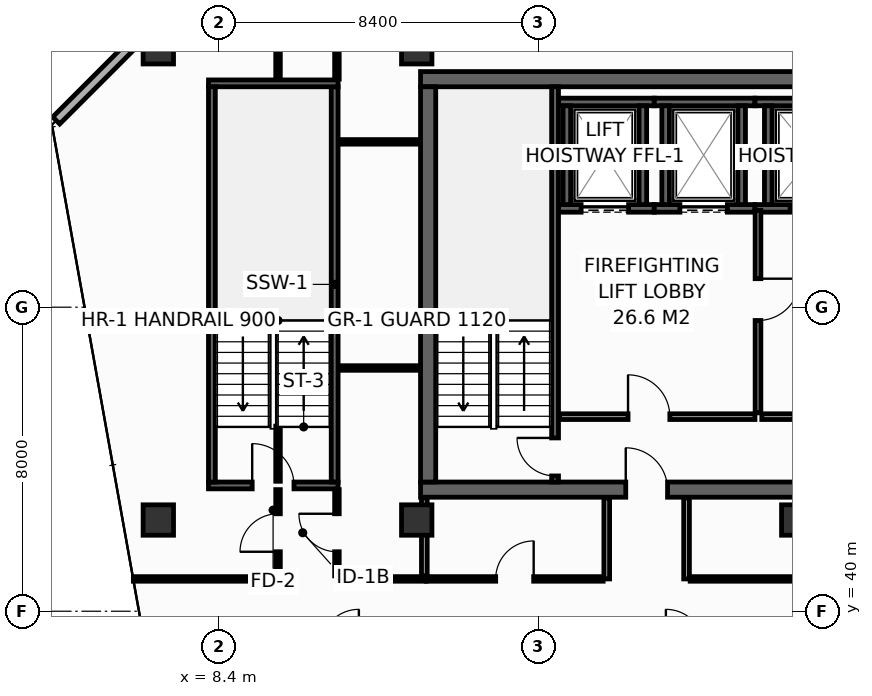
"""IFC4 building model, lengths in metres.
Left out: names, types, materials, properties, quantities, classifications, styles, units other than length and angle.
Written with IfcOpenShell. Run it as: python <this file> out.ifc"""

import sys

from ifc_helpers import new_model, si_unit, direction, frame, frame_2d, origin, origin_2d, place, context, subcontext, project, spatial, rectangle, hollow_rectangle, extrude, element, fill, save


model = new_model("IFC4")
c1 = context("Model", 3, precision=1e-05, world=origin(), true_north=direction((0.0, 1.0)))
c2 = subcontext(c1, "Body", "Model", "MODEL_VIEW")
j1 = project(units=[si_unit("LENGTHUNIT", "METRE"), si_unit("PLANEANGLEUNIT", "RADIAN")], contexts=[c1])
p1 = place(None, origin())
s1 = spatial("IfcSite", under=j1, at=p1, CompositionType="ELEMENT")
p2 = place(p1, origin())
s2 = spatial("IfcBuilding", under=s1, at=p2, CompositionType="ELEMENT")
p3 = place(p2, frame((0.0, 0.0, 257.2)))
s3 = spatial("IfcBuildingStorey", under=s2, at=p3, CompositionType="ELEMENT", Elevation=257.2)
p4 = place(p3, frame((13.7, 43.2, 0.0), z_axis=(0.0, 0.0, 1.0), x_axis=(1.0, 0.0, 0.0)))
e1 = element("IfcWall", 1, at=p4, inside=s3, PredefinedType="SHEAR", context=c2, shape_type="SweptSolid", body=[
    extrude(rectangle(XDim=32.5, YDim=0.4, at=frame_2d((16.25, 0.0))), origin(), (0.0, 0.0, 1.0), 3.55),
])
p5 = place(p4, frame((5.4, 0.0, 0.0)))
e2 = element("IfcOpeningElement", 2, at=p5, cuts=e1, PredefinedType="OPENING", context=c2, shape_type="SweptSolid", body=[
    extrude(rectangle(XDim=1.1, YDim=2.15, at=frame_2d((0.55, 1.075))), frame((0.0, 0.21, 0.0), z_axis=(0.0, -1.0, 0.0), x_axis=(1.0, 0.0, 0.0)), (0.0, 0.0, 1.0), 0.42),
])
p6 = place(p4, frame((25.6, 0.0, 0.0)))
e3 = element("IfcOpeningElement", 3, at=p6, cuts=e1, PredefinedType="OPENING", context=c2, shape_type="SweptSolid", body=[
    extrude(rectangle(XDim=1.1, YDim=2.15, at=frame_2d((0.55, 1.075))), frame((0.0, 0.21, 0.0), z_axis=(0.0, -1.0, 0.0), x_axis=(1.0, 0.0, 0.0)), (0.0, 0.0, 1.0), 0.42),
])
p7 = place(p3, frame((13.7, 54.0, 0.0), z_axis=(0.0, 0.0, 1.0), x_axis=(1.0, 0.0, 0.0)))
e4 = element("IfcWall", 4, at=p7, inside=s3, PredefinedType="SHEAR", context=c2, shape_type="SweptSolid", body=[
    extrude(rectangle(XDim=32.5, YDim=0.4, at=frame_2d((16.25, 0.0))), origin(), (0.0, 0.0, 1.0), 3.55),
])
p8 = place(p3, frame((13.9, 43.4, 0.0), z_axis=(0.0, 0.0, 1.0), x_axis=(0.0, 1.0, 0.0)))
e5 = element("IfcWall", 5, at=p8, inside=s3, PredefinedType="SHEAR", context=c2, shape_type="SweptSolid", body=[
    extrude(rectangle(XDim=10.4, YDim=0.4, at=frame_2d((5.2, 0.0))), origin(), (0.0, 0.0, 1.0), 3.55),
])
for number, where, z_axis, x_axis in (
    (6, (6.8, 54.8, 0.0), (0.0, 0.0, 1.0), (1.0, 0.0, 0.0)),
    (7, (13.6, 54.8, 0.0), (0.0, 0.0, 1.0), (1.0, 0.0, 0.0)),
    (8, (6.8, 42.4, 0.0), (0.0, 0.0, 1.0), (1.0, 0.0, 0.0)),
    (9, (13.6, 42.4, 0.0), (0.0, 0.0, 1.0), (1.0, 0.0, 0.0)),
    (10, (23.6, 42.4, 0.0), (0.0, 0.0, 1.0), (1.0, 0.0, 0.0)),
):
    element("IfcColumn", number, at=place(p3, frame(where, z_axis=z_axis, x_axis=x_axis)), inside=s3, PredefinedType="COLUMN", context=c2, shape_type="SweptSolid", body=[
        extrude(hollow_rectangle(XDim=0.8, YDim=0.8, WallThickness=0.036, at=origin_2d()), origin(), (0.0, 0.0, 1.0), 3.8),
    ])
p9 = place(p3, frame((17.33, 50.6, 0.0), z_axis=(0.0, 0.0, 1.0), x_axis=(1.0, 0.0, 0.0)))
e11 = element("IfcWall", 11, at=p9, inside=s3, PredefinedType="SHEAR", context=c2, shape_type="SweptSolid", body=[
    extrude(rectangle(XDim=2.52, YDim=0.2, at=frame_2d((1.26, 0.0))), origin(), (0.0, 0.0, 1.0), 3.55),
])
p10 = place(p9, frame((0.595, 0.0, 0.0)))
e12 = element("IfcOpeningElement", 12, at=p10, cuts=e11, PredefinedType="OPENING", context=c2, shape_type="SweptSolid", body=[
    extrude(rectangle(XDim=1.25, YDim=2.3, at=frame_2d((0.625, 1.15))), frame((0.0, 0.11, 0.0), z_axis=(0.0, -1.0, 0.0), x_axis=(1.0, 0.0, 0.0)), (0.0, 0.0, 1.0), 0.22),
])
p11 = place(p3, frame((17.33, 53.4, 0.0), z_axis=(0.0, 0.0, 1.0), x_axis=(1.0, 0.0, 0.0)))
e13 = element("IfcWall", 13, at=p11, inside=s3, PredefinedType="SHEAR", context=c2, shape_type="SweptSolid", body=[
    extrude(rectangle(XDim=2.52, YDim=0.2, at=frame_2d((1.26, 0.0))), origin(), (0.0, 0.0, 1.0), 3.55),
])
for number, where, z_axis, x_axis in (
    (14, (17.55, 50.7, 0.0), (0.0, 0.0, 1.0), (0.0, 1.0, 0.0)),
    (15, (19.55, 50.7, 0.0), (0.0, 0.0, 1.0), (0.0, 1.0, 0.0)),
):
    element("IfcWall", number, at=place(p3, frame(where, z_axis=z_axis, x_axis=x_axis)), inside=s3, PredefinedType="SHEAR", context=c2, shape_type="SweptSolid", body=[
        extrude(rectangle(XDim=2.6, YDim=0.2, at=frame_2d((1.3, 0.0))), origin(), (0.0, 0.0, 1.0), 3.55),
    ])
p12 = place(p3, frame((19.85, 50.6, 0.0), z_axis=(0.0, 0.0, 1.0), x_axis=(1.0, 0.0, 0.0)))
e16 = element("IfcWall", 16, at=p12, inside=s3, PredefinedType="SHEAR", context=c2, shape_type="SweptSolid", body=[
    extrude(rectangle(XDim=2.65, YDim=0.2, at=frame_2d((1.325, 0.0))), origin(), (0.0, 0.0, 1.0), 3.55),
])
p13 = place(p12, frame((0.675, 0.0, 0.0)))
e17 = element("IfcOpeningElement", 17, at=p13, cuts=e16, PredefinedType="OPENING", context=c2, shape_type="SweptSolid", body=[
    extrude(rectangle(XDim=1.25, YDim=2.3, at=frame_2d((0.625, 1.15))), frame((0.0, 0.11, 0.0), z_axis=(0.0, -1.0, 0.0), x_axis=(1.0, 0.0, 0.0)), (0.0, 0.0, 1.0), 0.22),
])
p14 = place(p3, frame((19.85, 53.4, 0.0), z_axis=(0.0, 0.0, 1.0), x_axis=(1.0, 0.0, 0.0)))
e18 = element("IfcWall", 18, at=p14, inside=s3, PredefinedType="SHEAR", context=c2, shape_type="SweptSolid", body=[
    extrude(rectangle(XDim=2.65, YDim=0.2, at=frame_2d((1.325, 0.0))), origin(), (0.0, 0.0, 1.0), 3.55),
])
for number, where, z_axis, x_axis in (
    (19, (20.15, 50.7, 0.0), (0.0, 0.0, 1.0), (0.0, 1.0, 0.0)),
    (20, (22.15, 50.7, 0.0), (0.0, 0.0, 1.0), (0.0, 1.0, 0.0)),
):
    element("IfcWall", number, at=place(p3, frame(where, z_axis=z_axis, x_axis=x_axis)), inside=s3, PredefinedType="SHEAR", context=c2, shape_type="SweptSolid", body=[
        extrude(rectangle(XDim=2.6, YDim=0.2, at=frame_2d((1.3, 0.0))), origin(), (0.0, 0.0, 1.0), 3.55),
    ])
p15 = place(p3, frame((22.5, 50.6, 0.0), z_axis=(0.0, 0.0, 1.0), x_axis=(1.0, 0.0, 0.0)))
e21 = element("IfcWall", 21, at=p15, inside=s3, PredefinedType="SHEAR", context=c2, shape_type="SweptSolid", body=[
    extrude(rectangle(XDim=2.85, YDim=0.2, at=frame_2d((1.425, 0.0))), origin(), (0.0, 0.0, 1.0), 3.55),
])
p16 = place(p15, frame((0.925, 0.0, 0.0)))
e22 = element("IfcOpeningElement", 22, at=p16, cuts=e21, PredefinedType="OPENING", context=c2, shape_type="SweptSolid", body=[
    extrude(rectangle(XDim=1.25, YDim=2.3, at=frame_2d((0.625, 1.15))), frame((0.0, 0.11, 0.0), z_axis=(0.0, -1.0, 0.0), x_axis=(1.0, 0.0, 0.0)), (0.0, 0.0, 1.0), 0.22),
])
p17 = place(p3, frame((22.5, 53.4, 0.0), z_axis=(0.0, 0.0, 1.0), x_axis=(1.0, 0.0, 0.0)))
e23 = element("IfcWall", 23, at=p17, inside=s3, PredefinedType="SHEAR", context=c2, shape_type="SweptSolid", body=[
    extrude(rectangle(XDim=2.85, YDim=0.2, at=frame_2d((1.425, 0.0))), origin(), (0.0, 0.0, 1.0), 3.55),
])
p18 = place(p3, frame((22.85, 50.7, 0.0), z_axis=(0.0, 0.0, 1.0), x_axis=(0.0, 1.0, 0.0)))
e24 = element("IfcWall", 24, at=p18, inside=s3, PredefinedType="SHEAR", context=c2, shape_type="SweptSolid", body=[
    extrude(rectangle(XDim=2.6, YDim=0.2, at=frame_2d((1.3, 0.0))), origin(), (0.0, 0.0, 1.0), 3.55),
])
p19 = place(p3, frame((17.24, 43.4, 0.0), z_axis=(0.0, 0.0, 1.0), x_axis=(0.0, 1.0, 0.0)))
e25 = element("IfcWall", 25, at=p19, inside=s3, PredefinedType="SHEAR", context=c2, shape_type="SweptSolid", body=[
    extrude(rectangle(XDim=10.4, YDim=0.18, at=frame_2d((5.2, 0.0))), origin(), (0.0, 0.0, 1.0), 3.55),
])
p20 = place(p19, frame((0.16, 0.0, 0.0)))
e26 = element("IfcOpeningElement", 26, at=p20, cuts=e25, PredefinedType="OPENING", context=c2, shape_type="SweptSolid", body=[
    extrude(rectangle(XDim=1.0, YDim=2.15, at=frame_2d((0.5, 1.075))), frame((0.0, 0.1, 0.0), z_axis=(0.0, -1.0, 0.0), x_axis=(1.0, 0.0, 0.0)), (0.0, 0.0, 1.0), 0.2),
])
p21 = place(p3, frame((8.12, 43.31, 0.0), z_axis=(0.0, 0.0, 1.0), x_axis=(1.0, 0.0, 0.0)))
e27 = element("IfcWall", 27, at=p21, inside=s3, PredefinedType="SHEAR", context=c2, shape_type="SweptSolid", body=[
    extrude(rectangle(XDim=3.41, YDim=0.18, at=frame_2d((1.705, 0.0))), origin(), (0.0, 0.0, 1.0), 3.55),
])
p22 = place(p21, frame((1.15, 0.0, 0.0)))
e28 = element("IfcOpeningElement", 28, at=p22, cuts=e27, PredefinedType="OPENING", context=c2, shape_type="SweptSolid", body=[
    extrude(rectangle(XDim=1.1, YDim=2.15, at=frame_2d((0.55, 1.075))), frame((0.0, 0.1, 0.0), z_axis=(0.0, -1.0, 0.0), x_axis=(1.0, 0.0, 0.0)), (0.0, 0.0, 1.0), 0.2),
])
p23 = place(p3, frame((11.44, 43.4, 0.0), z_axis=(0.0, 0.0, 1.0), x_axis=(0.0, 1.0, 0.0)))
e29 = element("IfcWall", 29, at=p23, inside=s3, PredefinedType="SHEAR", context=c2, shape_type="SweptSolid", body=[
    extrude(rectangle(XDim=10.4, YDim=0.18, at=frame_2d((5.2, 0.0))), origin(), (0.0, 0.0, 1.0), 3.55),
])
p24 = place(p3, frame((11.53, 53.89, 0.0), z_axis=(0.0, 0.0, 1.0), x_axis=(-1.0, 0.0, 0.0)))
e30 = element("IfcWall", 30, at=p24, inside=s3, PredefinedType="SHEAR", context=c2, shape_type="SweptSolid", body=[
    extrude(rectangle(XDim=3.41, YDim=0.18, at=frame_2d((1.705, 0.0))), origin(), (0.0, 0.0, 1.0), 3.55),
])
p25 = place(p3, frame((8.21, 53.8, 0.0), z_axis=(0.0, 0.0, 1.0), x_axis=(0.0, -1.0, 0.0)))
e31 = element("IfcWall", 31, at=p25, inside=s3, PredefinedType="SHEAR", context=c2, shape_type="SweptSolid", body=[
    extrude(rectangle(XDim=10.4, YDim=0.18, at=frame_2d((5.2, 0.0))), origin(), (0.0, 0.0, 1.0), 3.55),
])
p26 = place(p3, frame((17.36, 45.12, 0.0), z_axis=(0.0, 0.0, 1.0), x_axis=(1.0, 0.0, 0.0)))
e32 = element("IfcWall", 32, at=p26, inside=s3, PredefinedType="PARTITIONING", context=c2, shape_type="SweptSolid", body=[
    extrude(rectangle(XDim=5.14, YDim=0.15, at=frame_2d((2.57, 0.0))), origin(), (0.0, 0.0, 1.0), 3.55),
])
p27 = place(p26, frame((1.8, 0.0, 0.0)))
e33 = element("IfcOpeningElement", 33, at=p27, cuts=e32, PredefinedType="OPENING", context=c2, shape_type="SweptSolid", body=[
    extrude(rectangle(XDim=1.1, YDim=2.15, at=frame_2d((0.55, 1.075))), frame((0.0, 0.085, 0.0), z_axis=(0.0, -1.0, 0.0), x_axis=(1.0, 0.0, 0.0)), (0.0, 0.0, 1.0), 0.17),
])
p28 = place(p3, frame((22.58, 50.55, 0.0), z_axis=(0.0, 0.0, 1.0), x_axis=(0.0, -1.0, 0.0)))
e34 = element("IfcWall", 34, at=p28, inside=s3, PredefinedType="PARTITIONING", context=c2, shape_type="SweptSolid", body=[
    extrude(rectangle(XDim=5.33, YDim=0.15, at=frame_2d((2.665, 0.0))), origin(), (0.0, 0.0, 1.0), 3.55),
])
p29 = place(p28, frame((1.8, 0.0, 0.0)))
e35 = element("IfcOpeningElement", 35, at=p29, cuts=e34, PredefinedType="OPENING", context=c2, shape_type="SweptSolid", body=[
    extrude(rectangle(XDim=1.1, YDim=2.15, at=frame_2d((0.55, 1.075))), frame((0.0, 0.085, 0.0), z_axis=(0.0, -1.0, 0.0), x_axis=(1.0, 0.0, 0.0)), (0.0, 0.0, 1.0), 0.17),
])
p30 = place(p3, frame((22.68, 45.12, 0.0), z_axis=(0.0, 0.0, 1.0), x_axis=(1.0, 0.0, 0.0)))
e36 = element("IfcWall", 36, at=p30, inside=s3, PredefinedType="PARTITIONING", context=c2, shape_type="SweptSolid", body=[
    extrude(rectangle(XDim=2.92, YDim=0.15, at=frame_2d((1.46, 0.0))), origin(), (0.0, 0.0, 1.0), 3.55),
])
p31 = place(p30, frame((0.85, 0.0, 0.0)))
e37 = element("IfcOpeningElement", 37, at=p31, cuts=e36, PredefinedType="OPENING", context=c2, shape_type="SweptSolid", body=[
    extrude(rectangle(XDim=1.1, YDim=2.15, at=frame_2d((0.55, 1.075))), frame((0.0, 0.085, 0.0), z_axis=(0.0, -1.0, 0.0), x_axis=(1.0, 0.0, 0.0)), (0.0, 0.0, 1.0), 0.17),
])
p32 = place(p3, frame((7.087, 55.887, 0.0), z_axis=(0.0, 0.0, 1.0), x_axis=(-0.707106781187, -0.707106781187, 0.0)))
e38 = element("IfcWall", 38, at=p32, inside=s3, PredefinedType="STANDARD", context=c2, shape_type="SweptSolid", body=[
    extrude(rectangle(XDim=4.206, YDim=0.26, at=frame_2d((2.103, 0.0))), origin(), (0.0, 0.0, 1.0), 3.55),
])
p33 = place(p3, frame((6.143, 40.85, 0.0), z_axis=(0.0, 0.0, 1.0), x_axis=(1.0, 0.0, 0.0)))
e39 = element("IfcWall", 39, at=p33, inside=s3, PredefinedType="PARTITIONING", context=c2, shape_type="SweptSolid", body=[
    extrude(rectangle(XDim=3.807, YDim=0.12, at=frame_2d((1.903, 0.0))), origin(), (0.0, 0.0, 1.0), 3.085),
])
p34 = place(p3, frame((11.5, 40.85, 0.0), z_axis=(0.0, 0.0, 1.0), x_axis=(1.0, 0.0, 0.0)))
e40 = element("IfcWall", 40, at=p34, inside=s3, PredefinedType="PARTITIONING", context=c2, shape_type="SweptSolid", body=[
    extrude(rectangle(XDim=2.35, YDim=0.12, at=frame_2d((1.175, 0.0))), origin(), (0.0, 0.0, 1.0), 3.55),
])
p35 = place(p3, frame((11.55, 52.35, 0.0), z_axis=(0.0, 0.0, 1.0), x_axis=(1.0, 0.0, 0.0)))
e41 = element("IfcWall", 41, at=p35, inside=s3, PredefinedType="PARTITIONING", context=c2, shape_type="SweptSolid", body=[
    extrude(rectangle(XDim=2.13, YDim=0.12, at=frame_2d((1.065, 0.0))), origin(), (0.0, 0.0, 1.0), 3.55),
])
p36 = place(p3, frame((11.5, 54.0, 0.0), z_axis=(0.0, 0.0, 1.0), x_axis=(0.0, 1.0, 0.0)))
e42 = element("IfcWall", 42, at=p36, inside=s3, PredefinedType="PARTITIONING", context=c2, shape_type="SweptSolid", body=[
    extrude(rectangle(XDim=1.995, YDim=0.12, at=frame_2d((0.998, 0.0))), origin(), (0.0, 0.0, 1.0), 2.935),
])
p37 = place(p3, frame((4.936, 47.6, 0.0), z_axis=(0.0, 0.0, 1.0), x_axis=(1.0, 0.0, 0.0)))
e43 = element("IfcWall", 43, at=p37, inside=s3, PredefinedType="PARTITIONING", context=c2, shape_type="SweptSolid", body=[
    extrude(rectangle(XDim=3.165, YDim=0.12, at=frame_2d((1.582, 0.0))), origin(), (0.0, 0.0, 1.0), 2.947),
])
p38 = place(p3, frame((9.95, 40.93, 0.0), z_axis=(0.0, 0.0, 1.0), x_axis=(0.0, 1.0, 0.0)))
e44 = element("IfcWall", 44, at=p38, inside=s3, PredefinedType="PARTITIONING", context=c2, shape_type="SweptSolid", body=[
    extrude(rectangle(XDim=2.27, YDim=0.12, at=frame_2d((1.135, 0.0))), origin(), (0.0, 0.0, 1.0), 2.947),
])
p39 = place(p38, frame((0.635, 0.0, 0.0)))
e45 = element("IfcOpeningElement", 45, at=p39, cuts=e44, PredefinedType="OPENING", context=c2, shape_type="SweptSolid", body=[
    extrude(rectangle(XDim=1.0, YDim=2.15, at=frame_2d((0.5, 1.075))), frame((0.0, 0.07, 0.0), z_axis=(0.0, -1.0, 0.0), x_axis=(1.0, 0.0, 0.0)), (0.0, 0.0, 1.0), 0.14),
])
p40 = place(p3, frame((9.95, 43.42, 0.0), z_axis=(0.0, 0.0, 1.0), x_axis=(0.0, 1.0, 0.0)))
e46 = element("IfcWall", 46, at=p40, inside=s3, PredefinedType="PARTITIONING", context=c2, shape_type="SweptSolid", body=[
    extrude(rectangle(XDim=1.45, YDim=0.12, at=frame_2d((0.725, 0.0))), origin(), (0.0, 0.0, 1.0), 3.55),
])
p41 = place(p3, frame((9.95, 54.0, 0.0), z_axis=(0.0, 0.0, 1.0), x_axis=(0.0, 1.0, 0.0)))
e47 = element("IfcWall", 47, at=p41, inside=s3, PredefinedType="PARTITIONING", context=c2, shape_type="SweptSolid", body=[
    extrude(rectangle(XDim=1.995, YDim=0.12, at=frame_2d((0.998, 0.0))), origin(), (0.0, 0.0, 1.0), 2.935),
])
p42 = place(p3, frame((11.55, 46.4, 0.0), z_axis=(0.0, 0.0, 1.0), x_axis=(1.0, 0.0, 0.0)))
e48 = element("IfcWall", 48, at=p42, inside=s3, PredefinedType="PARTITIONING", context=c2, shape_type="SweptSolid", body=[
    extrude(rectangle(XDim=2.13, YDim=0.12, at=frame_2d((1.065, 0.0))), origin(), (0.0, 0.0, 1.0), 3.55),
])
p43 = place(p3, frame((11.5, 40.93, 0.0), z_axis=(0.0, 0.0, 1.0), x_axis=(0.0, 1.0, 0.0)))
e49 = element("IfcWall", 49, at=p43, inside=s3, PredefinedType="PARTITIONING", context=c2, shape_type="SweptSolid", body=[
    extrude(rectangle(XDim=2.27, YDim=0.12, at=frame_2d((1.135, 0.0))), origin(), (0.0, 0.0, 1.0), 2.947),
])
p44 = place(p43, frame((0.635, 0.0, 0.0)))
e50 = element("IfcOpeningElement", 50, at=p44, cuts=e49, PredefinedType="OPENING", context=c2, shape_type="SweptSolid", body=[
    extrude(rectangle(XDim=1.0, YDim=2.15, at=frame_2d((0.5, 1.075))), frame((0.0, 0.07, 0.0), z_axis=(0.0, -1.0, 0.0), x_axis=(1.0, 0.0, 0.0)), (0.0, 0.0, 1.0), 0.14),
])
p45 = place(p3, frame((13.8, 40.93, 0.0), z_axis=(0.0, 0.0, 1.0), x_axis=(0.0, 1.0, 0.0)))
e51 = element("IfcWall", 51, at=p45, inside=s3, PredefinedType="PARTITIONING", context=c2, shape_type="SweptSolid", body=[
    extrude(rectangle(XDim=2.05, YDim=0.15, at=frame_2d((1.025, 0.0))), origin(), (0.0, 0.0, 1.0), 3.55),
])
for number, where, z_axis, x_axis in (
    (52, (18.6, 40.85, 0.0), (0.0, 0.0, 1.0), (0.0, 1.0, 0.0)),
    (53, (20.7, 40.85, 0.0), (0.0, 0.0, 1.0), (0.0, 1.0, 0.0)),
):
    element("IfcWall", number, at=place(p3, frame(where, z_axis=z_axis, x_axis=x_axis)), inside=s3, PredefinedType="PARTITIONING", context=c2, shape_type="SweptSolid", body=[
        extrude(rectangle(XDim=2.13, YDim=0.15, at=frame_2d((1.065, 0.0))), origin(), (0.0, 0.0, 1.0), 3.55),
    ])
p46 = place(p3, frame((13.85, 40.85, 0.0), z_axis=(0.0, 0.0, 1.0), x_axis=(1.0, 0.0, 0.0)))
e54 = element("IfcWall", 54, at=p46, inside=s3, PredefinedType="PARTITIONING", context=c2, shape_type="SweptSolid", body=[
    extrude(rectangle(XDim=4.655, YDim=0.12, at=frame_2d((2.327, 0.0))), origin(), (0.0, 0.0, 1.0), 3.55),
])
p47 = place(p46, frame((1.827, 0.0, 0.0)))
e55 = element("IfcOpeningElement", 55, at=p47, cuts=e54, PredefinedType="OPENING", context=c2, shape_type="SweptSolid", body=[
    extrude(rectangle(XDim=1.0, YDim=2.15, at=frame_2d((0.5, 1.075))), frame((0.0, 0.07, 0.0), z_axis=(0.0, -1.0, 0.0), x_axis=(1.0, 0.0, 0.0)), (0.0, 0.0, 1.0), 0.14),
])
p48 = place(p3, frame((20.795, 40.85, 0.0), z_axis=(0.0, 0.0, 1.0), x_axis=(1.0, 0.0, 0.0)))
e56 = element("IfcWall", 56, at=p48, inside=s3, PredefinedType="PARTITIONING", context=c2, shape_type="SweptSolid", body=[
    extrude(rectangle(XDim=12.125, YDim=0.12, at=frame_2d((6.062, 0.0))), origin(), (0.0, 0.0, 1.0), 2.947),
])
p49 = place(p48, frame((5.562, 0.0, 0.0)))
e57 = element("IfcOpeningElement", 57, at=p49, cuts=e56, PredefinedType="OPENING", context=c2, shape_type="SweptSolid", body=[
    extrude(rectangle(XDim=1.0, YDim=2.15, at=frame_2d((0.5, 1.075))), frame((0.0, 0.07, 0.0), z_axis=(0.0, -1.0, 0.0), x_axis=(1.0, 0.0, 0.0)), (0.0, 0.0, 1.0), 0.14),
])
p50 = place(p10, origin())
e58 = element("IfcDoor", 58, at=p50, inside=s3, OperationType="SLIDING_TO_LEFT", PredefinedType="DOOR", context=c2, shape_type="SweptSolid", body=[
    extrude(rectangle(XDim=1.25, YDim=2.3, at=frame_2d((0.625, 1.15))), frame((0.0, 0.025, 0.0), z_axis=(0.0, -1.0, 0.0), x_axis=(1.0, 0.0, 0.0)), (0.0, 0.0, 1.0), 0.05),
])
fill(e12, e58)
p51 = place(p13, origin())
e59 = element("IfcDoor", 59, at=p51, inside=s3, OperationType="SLIDING_TO_LEFT", PredefinedType="DOOR", context=c2, shape_type="SweptSolid", body=[
    extrude(rectangle(XDim=1.25, YDim=2.3, at=frame_2d((0.625, 1.15))), frame((0.0, 0.025, 0.0), z_axis=(0.0, -1.0, 0.0), x_axis=(1.0, 0.0, 0.0)), (0.0, 0.0, 1.0), 0.05),
])
fill(e17, e59)
p52 = place(p16, origin())
e60 = element("IfcDoor", 60, at=p52, inside=s3, OperationType="SLIDING_TO_LEFT", PredefinedType="DOOR", context=c2, shape_type="SweptSolid", body=[
    extrude(rectangle(XDim=1.25, YDim=2.3, at=frame_2d((0.625, 1.15))), frame((0.0, 0.025, 0.0), z_axis=(0.0, -1.0, 0.0), x_axis=(1.0, 0.0, 0.0)), (0.0, 0.0, 1.0), 0.05),
])
fill(e22, e60)
p53 = place(p20, origin())
e61 = element("IfcDoor", 61, at=p53, inside=s3, OperationType="SINGLE_SWING_RIGHT", PredefinedType="DOOR", context=c2, shape_type="SweptSolid", body=[
    extrude(rectangle(XDim=1.0, YDim=2.15, at=frame_2d((0.5, 1.075))), frame((0.0, 0.025, 0.0), z_axis=(0.0, -1.0, 0.0), x_axis=(1.0, 0.0, 0.0)), (0.0, 0.0, 1.0), 0.05),
])
fill(e26, e61)
p54 = place(p22, origin())
e62 = element("IfcDoor", 62, at=p54, inside=s3, OperationType="SINGLE_SWING_LEFT", PredefinedType="DOOR", context=c2, shape_type="SweptSolid", body=[
    extrude(rectangle(XDim=1.1, YDim=2.15, at=frame_2d((0.55, 1.075))), frame((0.0, 0.025, 0.0), z_axis=(0.0, -1.0, 0.0), x_axis=(1.0, 0.0, 0.0)), (0.0, 0.0, 1.0), 0.05),
])
fill(e28, e62)
p55 = place(p27, origin())
e63 = element("IfcDoor", 63, at=p55, inside=s3, OperationType="SINGLE_SWING_LEFT", PredefinedType="DOOR", context=c2, shape_type="SweptSolid", body=[
    extrude(rectangle(XDim=1.1, YDim=2.15, at=frame_2d((0.55, 1.075))), frame((0.0, 0.025, 0.0), z_axis=(0.0, -1.0, 0.0), x_axis=(1.0, 0.0, 0.0)), (0.0, 0.0, 1.0), 0.05),
])
fill(e33, e63)
p56 = place(p29, origin())
e64 = element("IfcDoor", 64, at=p56, inside=s3, OperationType="SINGLE_SWING_LEFT", PredefinedType="DOOR", context=c2, shape_type="SweptSolid", body=[
    extrude(rectangle(XDim=1.1, YDim=2.15, at=frame_2d((0.55, 1.075))), frame((0.0, 0.025, 0.0), z_axis=(0.0, -1.0, 0.0), x_axis=(1.0, 0.0, 0.0)), (0.0, 0.0, 1.0), 0.05),
])
fill(e35, e64)
p57 = place(p5, origin())
e65 = element("IfcDoor", 65, at=p57, inside=s3, OperationType="SINGLE_SWING_LEFT", PredefinedType="DOOR", context=c2, shape_type="SweptSolid", body=[
    extrude(rectangle(XDim=1.1, YDim=2.15, at=frame_2d((0.55, 1.075))), frame((0.0, 0.025, 0.0), z_axis=(0.0, -1.0, 0.0), x_axis=(1.0, 0.0, 0.0)), (0.0, 0.0, 1.0), 0.05),
])
fill(e2, e65)
p58 = place(p39, origin())
e66 = element("IfcDoor", 66, at=p58, inside=s3, OperationType="SINGLE_SWING_LEFT", PredefinedType="DOOR", context=c2, shape_type="SweptSolid", body=[
    extrude(rectangle(XDim=1.0, YDim=2.15, at=frame_2d((0.5, 1.075))), frame((0.0, 0.025, 0.0), z_axis=(0.0, -1.0, 0.0), x_axis=(1.0, 0.0, 0.0)), (0.0, 0.0, 1.0), 0.05),
])
fill(e45, e66)
p59 = place(p44, origin())
e67 = element("IfcDoor", 67, at=p59, inside=s3, OperationType="SINGLE_SWING_RIGHT", PredefinedType="DOOR", context=c2, shape_type="SweptSolid", body=[
    extrude(rectangle(XDim=1.0, YDim=2.15, at=frame_2d((0.5, 1.075))), frame((0.0, 0.025, 0.0), z_axis=(0.0, -1.0, 0.0), x_axis=(1.0, 0.0, 0.0)), (0.0, 0.0, 1.0), 0.05),
])
fill(e50, e67)
p60 = place(p47, origin())
e68 = element("IfcDoor", 68, at=p60, inside=s3, OperationType="SINGLE_SWING_RIGHT", PredefinedType="DOOR", context=c2, shape_type="SweptSolid", body=[
    extrude(rectangle(XDim=1.0, YDim=2.15, at=frame_2d((0.5, 1.075))), frame((0.0, 0.025, 0.0), z_axis=(0.0, -1.0, 0.0), x_axis=(1.0, 0.0, 0.0)), (0.0, 0.0, 1.0), 0.05),
])
fill(e55, e68)
save(model, sys.argv[1])
